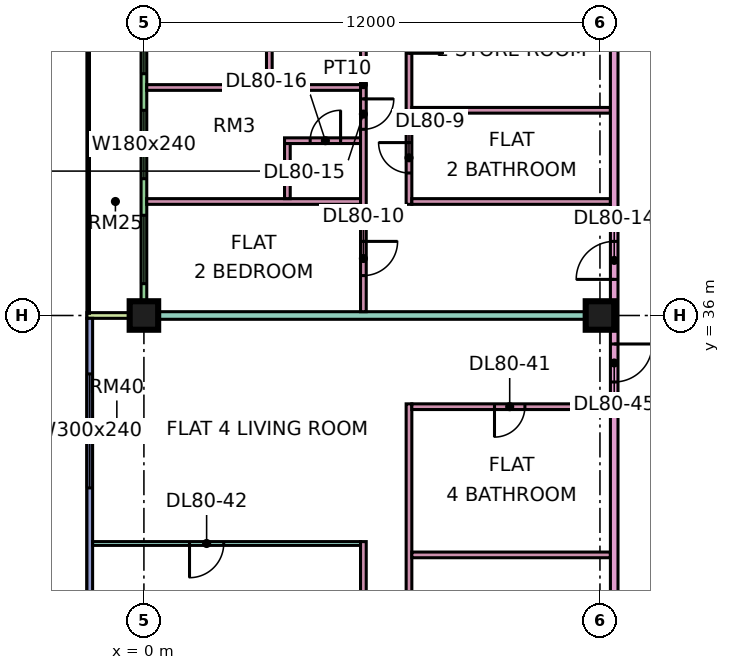
"""IFC4 building model, lengths in metres.
Left out: names, types, materials, properties, quantities, classifications, styles, units other than length and angle.
Written with IfcOpenShell. Run it as: python <this file> out.ifc"""

import sys

from ifc_helpers import new_model, si_unit, direction, frame, frame_2d, origin, origin_2d, place, context, subcontext, project, spatial, rectangle, extrude, element, fill, save


model = new_model("IFC4")
c1 = context("Model", 3, precision=1e-05, world=origin(), true_north=direction((0.0, 1.0)))
c2 = subcontext(c1, "Body", "Model", "MODEL_VIEW")
j1 = project(units=[si_unit("LENGTHUNIT", "METRE"), si_unit("PLANEANGLEUNIT", "RADIAN")], contexts=[c1])
p1 = place(None, origin())
s1 = spatial("IfcSite", under=j1, at=p1, CompositionType="ELEMENT")
p2 = place(p1, origin())
s2 = spatial("IfcBuilding", under=s1, at=p2, CompositionType="ELEMENT")
p3 = place(p2, frame((0.0, 0.0, 346.4)))
s3 = spatial("IfcBuildingStorey", under=s2, at=p3, CompositionType="ELEMENT", Elevation=346.4)
p4 = place(p3, frame((0.0, 36.0, 0.0), z_axis=(0.0, 0.0, 1.0), x_axis=(1.0, 0.0, 0.0)))
e1 = element("IfcColumn", 1, at=p4, inside=s3, PredefinedType="COLUMN", context=c2, shape_type="SweptSolid", body=[
    extrude(rectangle(XDim=0.75, YDim=0.75, at=origin_2d()), origin(), (0.0, 0.0, 1.0), 3.75),
])
p5 = place(p3, frame((12.0, 36.0, 0.0), z_axis=(0.0, 0.0, 1.0), x_axis=(1.0, 0.0, 0.0)))
e2 = element("IfcColumn", 2, at=p5, inside=s3, PredefinedType="COLUMN", context=c2, shape_type="SweptSolid", body=[
    extrude(rectangle(XDim=0.75, YDim=0.75, at=origin_2d()), origin(), (0.0, 0.0, 1.0), 3.75),
])
p6 = place(p3, frame((0.0, 47.925, 0.0), z_axis=(0.0, 0.0, 1.0), x_axis=(0.0, -1.0, 0.0)))
e3 = element("IfcWall", 3, at=p6, inside=s3, PredefinedType="SOLIDWALL", context=c2, shape_type="SweptSolid", body=[
    extrude(rectangle(XDim=11.85, YDim=0.15, at=frame_2d((5.925, 0.0))), origin(), (0.0, 0.0, 1.0), 3.35),
])
p7 = place(p6, frame((0.625, 0.0, 0.0)))
e4 = element("IfcOpeningElement", 4, at=p7, cuts=e3, PredefinedType="OPENING", context=c2, shape_type="SweptSolid", body=[
    extrude(rectangle(XDim=1.2, YDim=2.4, at=frame_2d((0.6, 1.2))), frame((0.0, 0.085, 0.0), z_axis=(0.0, -1.0, 0.0), x_axis=(1.0, 0.0, 0.0)), (0.0, 0.0, 1.0), 0.17),
])
p8 = place(p6, frame((3.762, 0.0, 0.45)))
e5 = element("IfcOpeningElement", 5, at=p8, cuts=e3, PredefinedType="OPENING", context=c2, shape_type="SweptSolid", body=[
    extrude(rectangle(XDim=1.8, YDim=2.4, at=frame_2d((0.9, 1.2))), frame((0.0, 0.085, 0.0), z_axis=(0.0, -1.0, 0.0), x_axis=(1.0, 0.0, 0.0)), (0.0, 0.0, 1.0), 0.17),
])
p9 = place(p6, frame((6.525, 0.0, 0.45)))
e6 = element("IfcOpeningElement", 6, at=p9, cuts=e3, PredefinedType="OPENING", context=c2, shape_type="SweptSolid", body=[
    extrude(rectangle(XDim=1.8, YDim=2.4, at=frame_2d((0.9, 1.2))), frame((0.0, 0.085, 0.0), z_axis=(0.0, -1.0, 0.0), x_axis=(1.0, 0.0, 0.0)), (0.0, 0.0, 1.0), 0.17),
])
p10 = place(p6, frame((9.288, 0.0, 0.45)))
e7 = element("IfcOpeningElement", 7, at=p10, cuts=e3, PredefinedType="OPENING", context=c2, shape_type="SweptSolid", body=[
    extrude(rectangle(XDim=1.8, YDim=2.4, at=frame_2d((0.9, 1.2))), frame((0.0, 0.085, 0.0), z_axis=(0.0, -1.0, 0.0), x_axis=(1.0, 0.0, 0.0)), (0.0, 0.0, 1.0), 0.17),
])
p11 = place(p3, frame((-1.5, 36.0, 0.0), z_axis=(0.0, 0.0, 1.0), x_axis=(1.0, 0.0, 0.0)))
e8 = element("IfcWall", 8, at=p11, inside=s3, PredefinedType="SOLIDWALL", context=c2, shape_type="SweptSolid", body=[
    extrude(rectangle(XDim=1.5, YDim=0.15, at=frame_2d((0.75, 0.0))), origin(), (0.0, 0.0, 1.0), 3.35),
])
p12 = place(p3, frame((-1.425, 35.925, 0.0), z_axis=(0.0, 0.0, 1.0), x_axis=(0.0, -1.0, 0.0)))
e9 = element("IfcWall", 9, at=p12, inside=s3, PredefinedType="SOLIDWALL", context=c2, shape_type="SweptSolid", body=[
    extrude(rectangle(XDim=11.85, YDim=0.15, at=frame_2d((5.925, 0.0))), origin(), (0.0, 0.0, 1.0), 3.35),
])
p13 = place(p12, frame((1.462, 0.0, 0.45)))
e10 = element("IfcOpeningElement", 10, at=p13, cuts=e9, PredefinedType="OPENING", context=c2, shape_type="SweptSolid", body=[
    extrude(rectangle(XDim=3.0, YDim=2.4, at=frame_2d((1.5, 1.2))), frame((0.0, 0.085, 0.0), z_axis=(0.0, -1.0, 0.0), x_axis=(1.0, 0.0, 0.0)), (0.0, 0.0, 1.0), 0.17),
])
p14 = place(p12, frame((7.387, 0.0, 0.45)))
e11 = element("IfcOpeningElement", 11, at=p14, cuts=e9, PredefinedType="OPENING", context=c2, shape_type="SweptSolid", body=[
    extrude(rectangle(XDim=3.0, YDim=2.4, at=frame_2d((1.5, 1.2))), frame((0.0, 0.085, 0.0), z_axis=(0.0, -1.0, 0.0), x_axis=(1.0, 0.0, 0.0)), (0.0, 0.0, 1.0), 0.17),
])
p15 = place(p3, frame((-1.35, 30.0, 0.0), z_axis=(0.0, 0.0, 1.0), x_axis=(1.0, 0.0, 0.0)))
e12 = element("IfcWall", 12, at=p15, inside=s3, PredefinedType="PARTITIONING", context=c2, shape_type="SweptSolid", body=[
    extrude(rectangle(XDim=7.05, YDim=0.1, at=frame_2d((3.525, 0.0))), origin(), (0.0, 0.0, 1.0), 3.35),
])
p16 = place(p15, frame((2.55, 0.0, 0.0)))
e13 = element("IfcOpeningElement", 13, at=p16, cuts=e12, PredefinedType="OPENING", context=c2, shape_type="SweptSolid", body=[
    extrude(rectangle(XDim=0.9, YDim=2.1, at=frame_2d((0.45, 1.05))), frame((0.0, 0.06, 0.0), z_axis=(0.0, -1.0, 0.0), x_axis=(1.0, 0.0, 0.0)), (0.0, 0.0, 1.0), 0.12),
])
e14 = element("IfcWall", 14, at=p4, inside=s3, PredefinedType="PARTITIONING", context=c2, shape_type="SweptSolid", body=[
    extrude(rectangle(XDim=12.275, YDim=0.2, at=frame_2d((6.137, 0.0))), origin(), (0.0, 0.0, 1.0), 3.35),
])
for number, where, z_axis, x_axis in (
    (15, (0.074, 39.0, 0.0), (0.0, 0.0, 1.0), (1.0, 0.0, 0.0)),
    (16, (0.074, 42.0, 0.0), (0.0, 0.0, 1.0), (1.0, 0.0, 0.0)),
):
    element("IfcWall", number, at=place(p3, frame(where, z_axis=z_axis, x_axis=x_axis)), inside=s3, PredefinedType="PARTITIONING", context=c2, shape_type="SweptSolid", body=[
        extrude(rectangle(XDim=5.626, YDim=0.15, at=frame_2d((2.813, 0.0))), origin(), (0.0, 0.0, 1.0), 3.35),
    ])
p17 = place(p3, frame((3.3, 42.075, 0.0), z_axis=(0.0, 0.0, 1.0), x_axis=(0.0, 1.0, 0.0)))
e17 = element("IfcWall", 17, at=p17, inside=s3, PredefinedType="PARTITIONING", context=c2, shape_type="SweptSolid", body=[
    extrude(rectangle(XDim=3.0, YDim=0.15, at=frame_2d((1.5, 0.0))), origin(), (0.0, 0.0, 1.0), 3.35),
])
p18 = place(p17, frame((0.975, 0.0, 0.0)))
e18 = element("IfcOpeningElement", 18, at=p18, cuts=e17, PredefinedType="OPENING", context=c2, shape_type="SweptSolid", body=[
    extrude(rectangle(XDim=0.8, YDim=2.1, at=frame_2d((0.4, 1.05))), frame((0.0, 0.085, 0.0), z_axis=(0.0, -1.0, 0.0), x_axis=(1.0, 0.0, 0.0)), (0.0, 0.0, 1.0), 0.17),
])
p19 = place(p3, frame((3.7, 40.6, 0.0), z_axis=(0.0, 0.0, 1.0), x_axis=(1.0, 0.0, 0.0)))
e19 = element("IfcWall", 19, at=p19, inside=s3, PredefinedType="PARTITIONING", context=c2, shape_type="SweptSolid", body=[
    extrude(rectangle(XDim=2.0, YDim=0.15, at=frame_2d((1.0, 0.0))), origin(), (0.0, 0.0, 1.0), 3.35),
])
p20 = place(p19, frame((0.675, 0.0, 0.0)))
e20 = element("IfcOpeningElement", 20, at=p20, cuts=e19, PredefinedType="OPENING", context=c2, shape_type="SweptSolid", body=[
    extrude(rectangle(XDim=0.8, YDim=2.1, at=frame_2d((0.4, 1.05))), frame((0.0, 0.085, 0.0), z_axis=(0.0, -1.0, 0.0), x_axis=(1.0, 0.0, 0.0)), (0.0, 0.0, 1.0), 0.17),
])
p21 = place(p3, frame((3.775, 39.075, 0.0), z_axis=(0.0, 0.0, 1.0), x_axis=(0.0, 1.0, 0.0)))
e21 = element("IfcWall", 21, at=p21, inside=s3, PredefinedType="PARTITIONING", context=c2, shape_type="SweptSolid", body=[
    extrude(rectangle(XDim=1.45, YDim=0.15, at=frame_2d((0.725, 0.0))), origin(), (0.0, 0.0, 1.0), 3.35),
])
p22 = place(p3, frame((5.775, 22.5, 0.0), z_axis=(0.0, 0.0, 1.0), x_axis=(0.0, 1.0, 0.0)))
e22 = element("IfcWall", 22, at=p22, inside=s3, PredefinedType="PARTITIONING", context=c2, shape_type="SweptSolid", body=[
    extrude(rectangle(XDim=7.55, YDim=0.15, at=frame_2d((3.775, 0.0))), origin(), (0.0, 0.0, 1.0), 3.35),
])
p23 = place(p3, frame((5.775, 36.1, 0.0), z_axis=(0.0, 0.0, 1.0), x_axis=(0.0, 1.0, 0.0)))
e23 = element("IfcWall", 23, at=p23, inside=s3, PredefinedType="PARTITIONING", context=c2, shape_type="SweptSolid", body=[
    extrude(rectangle(XDim=11.95, YDim=0.15, at=frame_2d((5.975, 0.0))), origin(), (0.0, 0.0, 1.0), 3.35),
])
p24 = place(p23, frame((0.95, 0.0, 0.0)))
e24 = element("IfcOpeningElement", 24, at=p24, cuts=e23, PredefinedType="OPENING", context=c2, shape_type="SweptSolid", body=[
    extrude(rectangle(XDim=0.9, YDim=2.1, at=frame_2d((0.45, 1.05))), frame((0.0, 0.085, 0.0), z_axis=(0.0, -1.0, 0.0), x_axis=(1.0, 0.0, 0.0)), (0.0, 0.0, 1.0), 0.17),
])
p25 = place(p23, frame((9.95, 0.0, 0.0)))
e25 = element("IfcOpeningElement", 25, at=p25, cuts=e23, PredefinedType="OPENING", context=c2, shape_type="SweptSolid", body=[
    extrude(rectangle(XDim=0.9, YDim=2.1, at=frame_2d((0.45, 1.05))), frame((0.0, 0.085, 0.0), z_axis=(0.0, -1.0, 0.0), x_axis=(1.0, 0.0, 0.0)), (0.0, 0.0, 1.0), 0.17),
])
p26 = place(p23, frame((4.8, 0.0, 0.0)))
e26 = element("IfcOpeningElement", 26, at=p26, cuts=e23, PredefinedType="OPENING", context=c2, shape_type="SweptSolid", body=[
    extrude(rectangle(XDim=0.8, YDim=2.1, at=frame_2d((0.4, 1.05))), frame((0.0, 0.085, 0.0), z_axis=(0.0, -1.0, 0.0), x_axis=(1.0, 0.0, 0.0)), (0.0, 0.0, 1.0), 0.17),
])
p27 = place(p3, frame((6.975, 22.5, 0.0), z_axis=(0.0, 0.0, 1.0), x_axis=(0.0, 1.0, 0.0)))
e27 = element("IfcWall", 27, at=p27, inside=s3, PredefinedType="PARTITIONING", context=c2, shape_type="SweptSolid", body=[
    extrude(rectangle(XDim=11.175, YDim=0.15, at=frame_2d((5.587, 0.0))), origin(), (0.0, 0.0, 1.0), 3.35),
])
p28 = place(p27, frame((3.05, 0.0, 0.0)))
e28 = element("IfcOpeningElement", 28, at=p28, cuts=e27, PredefinedType="OPENING", context=c2, shape_type="SweptSolid", body=[
    extrude(rectangle(XDim=0.9, YDim=2.1, at=frame_2d((0.45, 1.05))), frame((0.0, 0.085, 0.0), z_axis=(0.0, -1.0, 0.0), x_axis=(1.0, 0.0, 0.0)), (0.0, 0.0, 1.0), 0.17),
])
p29 = place(p3, frame((6.975, 38.925, 0.0), z_axis=(0.0, 0.0, 1.0), x_axis=(0.0, 1.0, 0.0)))
e29 = element("IfcWall", 29, at=p29, inside=s3, PredefinedType="PARTITIONING", context=c2, shape_type="SweptSolid", body=[
    extrude(rectangle(XDim=16.425, YDim=0.15, at=frame_2d((8.212, 0.0))), origin(), (0.0, 0.0, 1.0), 3.35),
])
p30 = place(p29, frame((0.825, 0.0, 0.0)))
e30 = element("IfcOpeningElement", 30, at=p30, cuts=e29, PredefinedType="OPENING", context=c2, shape_type="SweptSolid", body=[
    extrude(rectangle(XDim=0.8, YDim=2.1, at=frame_2d((0.4, 1.05))), frame((0.0, 0.085, 0.0), z_axis=(0.0, -1.0, 0.0), x_axis=(1.0, 0.0, 0.0)), (0.0, 0.0, 1.0), 0.17),
])
p31 = place(p29, frame((12.825, 0.0, 0.0)))
e31 = element("IfcOpeningElement", 31, at=p31, cuts=e29, PredefinedType="OPENING", context=c2, shape_type="SweptSolid", body=[
    extrude(rectangle(XDim=0.9, YDim=2.1, at=frame_2d((0.45, 1.05))), frame((0.0, 0.085, 0.0), z_axis=(0.0, -1.0, 0.0), x_axis=(1.0, 0.0, 0.0)), (0.0, 0.0, 1.0), 0.17),
])
p32 = place(p29, frame((3.975, 0.0, 0.0)))
e32 = element("IfcOpeningElement", 32, at=p32, cuts=e29, PredefinedType="OPENING", context=c2, shape_type="SweptSolid", body=[
    extrude(rectangle(XDim=0.9, YDim=2.1, at=frame_2d((0.45, 1.05))), frame((0.0, 0.085, 0.0), z_axis=(0.0, -1.0, 0.0), x_axis=(1.0, 0.0, 0.0)), (0.0, 0.0, 1.0), 0.17),
])
p33 = place(p29, frame((7.125, 0.0, 0.0)))
e33 = element("IfcOpeningElement", 33, at=p33, cuts=e29, PredefinedType="OPENING", context=c2, shape_type="SweptSolid", body=[
    extrude(rectangle(XDim=0.9, YDim=2.1, at=frame_2d((0.45, 1.05))), frame((0.0, 0.085, 0.0), z_axis=(0.0, -1.0, 0.0), x_axis=(1.0, 0.0, 0.0)), (0.0, 0.0, 1.0), 0.17),
])
p34 = place(p29, frame((9.675, 0.0, 0.0)))
e34 = element("IfcOpeningElement", 34, at=p34, cuts=e29, PredefinedType="OPENING", context=c2, shape_type="SweptSolid", body=[
    extrude(rectangle(XDim=0.8, YDim=2.1, at=frame_2d((0.4, 1.05))), frame((0.0, 0.085, 0.0), z_axis=(0.0, -1.0, 0.0), x_axis=(1.0, 0.0, 0.0)), (0.0, 0.0, 1.0), 0.17),
])
p35 = place(p3, frame((7.05, 29.7, 0.0), z_axis=(0.0, 0.0, 1.0), x_axis=(1.0, 0.0, 0.0)))
e35 = element("IfcWall", 35, at=p35, inside=s3, PredefinedType="PARTITIONING", context=c2, shape_type="SweptSolid", body=[
    extrude(rectangle(XDim=5.225, YDim=0.15, at=frame_2d((2.612, 0.0))), origin(), (0.0, 0.0, 1.0), 3.35),
])
p36 = place(p3, frame((7.05, 33.6, 0.0), z_axis=(0.0, 0.0, 1.0), x_axis=(1.0, 0.0, 0.0)))
e36 = element("IfcWall", 36, at=p36, inside=s3, PredefinedType="PARTITIONING", context=c2, shape_type="SweptSolid", body=[
    extrude(rectangle(XDim=5.225, YDim=0.15, at=frame_2d((2.612, 0.0))), origin(), (0.0, 0.0, 1.0), 3.35),
])
p37 = place(p36, frame((2.175, 0.0, 0.0)))
e37 = element("IfcOpeningElement", 37, at=p37, cuts=e36, PredefinedType="OPENING", context=c2, shape_type="SweptSolid", body=[
    extrude(rectangle(XDim=0.8, YDim=2.1, at=frame_2d((0.4, 1.05))), frame((0.0, 0.085, 0.0), z_axis=(0.0, -1.0, 0.0), x_axis=(1.0, 0.0, 0.0)), (0.0, 0.0, 1.0), 0.17),
])
for number, where, z_axis, x_axis in (
    (38, (7.05, 39.0, 0.0), (0.0, 0.0, 1.0), (1.0, 0.0, 0.0)),
    (39, (7.05, 41.4, 0.0), (0.0, 0.0, 1.0), (1.0, 0.0, 0.0)),
):
    element("IfcWall", number, at=place(p3, frame(where, z_axis=z_axis, x_axis=x_axis)), inside=s3, PredefinedType="PARTITIONING", context=c2, shape_type="SweptSolid", body=[
        extrude(rectangle(XDim=5.225, YDim=0.15, at=frame_2d((2.612, 0.0))), origin(), (0.0, 0.0, 1.0), 3.35),
    ])
p38 = place(p3, frame((12.375, 20.0, 0.0), z_axis=(0.0, 0.0, 1.0), x_axis=(0.0, 1.0, 0.0)))
e40 = element("IfcWall", 40, at=p38, inside=s3, PredefinedType="PARTITIONING", context=c2, shape_type="SweptSolid", body=[
    extrude(rectangle(XDim=33.926, YDim=0.2, at=frame_2d((16.963, 0.0))), origin(), (0.0, 0.0, 1.0), 3.35),
])
p39 = place(p38, frame((16.95, 0.0, 0.0)))
e41 = element("IfcOpeningElement", 41, at=p39, cuts=e40, PredefinedType="OPENING", context=c2, shape_type="SweptSolid", body=[
    extrude(rectangle(XDim=1.0, YDim=2.1, at=frame_2d((0.5, 1.05))), frame((0.0, 0.11, 0.0), z_axis=(0.0, -1.0, 0.0), x_axis=(1.0, 0.0, 0.0)), (0.0, 0.0, 1.0), 0.22),
])
p40 = place(p38, frame((0.6, 0.0, 0.0)))
e42 = element("IfcOpeningElement", 42, at=p40, cuts=e40, PredefinedType="OPENING", context=c2, shape_type="SweptSolid", body=[
    extrude(rectangle(XDim=1.2, YDim=2.1, at=frame_2d((0.6, 1.05))), frame((0.0, 0.11, 0.0), z_axis=(0.0, -1.0, 0.0), x_axis=(1.0, 0.0, 0.0)), (0.0, 0.0, 1.0), 0.22),
])
p41 = place(p38, frame((14.25, 0.0, 0.0)))
e43 = element("IfcOpeningElement", 43, at=p41, cuts=e40, PredefinedType="OPENING", context=c2, shape_type="SweptSolid", body=[
    extrude(rectangle(XDim=1.0, YDim=2.1, at=frame_2d((0.5, 1.05))), frame((0.0, 0.11, 0.0), z_axis=(0.0, -1.0, 0.0), x_axis=(1.0, 0.0, 0.0)), (0.0, 0.0, 1.0), 0.22),
])
p42 = place(p8, origin())
e44 = element("IfcWindow", 44, at=p42, inside=s3, PartitioningType="SINGLE_PANEL", PredefinedType="WINDOW", context=c2, shape_type="SweptSolid", body=[
    extrude(rectangle(XDim=1.8, YDim=2.4, at=frame_2d((0.9, 1.2))), frame((0.0, 0.03, 0.0), z_axis=(0.0, -1.0, 0.0), x_axis=(1.0, 0.0, 0.0)), (0.0, 0.0, 1.0), 0.06),
])
fill(e5, e44)
p43 = place(p9, origin())
e45 = element("IfcWindow", 45, at=p43, inside=s3, PartitioningType="SINGLE_PANEL", PredefinedType="WINDOW", context=c2, shape_type="SweptSolid", body=[
    extrude(rectangle(XDim=1.8, YDim=2.4, at=frame_2d((0.9, 1.2))), frame((0.0, 0.03, 0.0), z_axis=(0.0, -1.0, 0.0), x_axis=(1.0, 0.0, 0.0)), (0.0, 0.0, 1.0), 0.06),
])
fill(e6, e45)
p44 = place(p10, origin())
e46 = element("IfcWindow", 46, at=p44, inside=s3, PartitioningType="SINGLE_PANEL", PredefinedType="WINDOW", context=c2, shape_type="SweptSolid", body=[
    extrude(rectangle(XDim=1.8, YDim=2.4, at=frame_2d((0.9, 1.2))), frame((0.0, 0.03, 0.0), z_axis=(0.0, -1.0, 0.0), x_axis=(1.0, 0.0, 0.0)), (0.0, 0.0, 1.0), 0.06),
])
fill(e7, e46)
p45 = place(p13, origin())
e47 = element("IfcWindow", 47, at=p45, inside=s3, PartitioningType="SINGLE_PANEL", PredefinedType="WINDOW", context=c2, shape_type="SweptSolid", body=[
    extrude(rectangle(XDim=3.0, YDim=2.4, at=frame_2d((1.5, 1.2))), frame((0.0, 0.03, 0.0), z_axis=(0.0, -1.0, 0.0), x_axis=(1.0, 0.0, 0.0)), (0.0, 0.0, 1.0), 0.06),
])
fill(e10, e47)
p46 = place(p30, frame((0.8, 0.0, 0.0), z_axis=(0.0, 0.0, 1.0), x_axis=(-1.0, 0.0, 0.0)))
e48 = element("IfcDoor", 48, at=p46, inside=s3, OperationType="SINGLE_SWING_RIGHT", PredefinedType="DOOR", context=c2, shape_type="SweptSolid", body=[
    extrude(rectangle(XDim=0.8, YDim=2.1, at=frame_2d((0.4, 1.05))), frame((0.0, 0.025, 0.0), z_axis=(0.0, -1.0, 0.0), x_axis=(1.0, 0.0, 0.0)), (0.0, 0.0, 1.0), 0.05),
])
fill(e30, e48)
p47 = place(p24, origin())
e49 = element("IfcDoor", 49, at=p47, inside=s3, OperationType="SINGLE_SWING_RIGHT", PredefinedType="DOOR", context=c2, shape_type="SweptSolid", body=[
    extrude(rectangle(XDim=0.9, YDim=2.1, at=frame_2d((0.45, 1.05))), frame((0.0, 0.025, 0.0), z_axis=(0.0, -1.0, 0.0), x_axis=(1.0, 0.0, 0.0)), (0.0, 0.0, 1.0), 0.05),
])
fill(e24, e49)
p48 = place(p39, origin())
e50 = element("IfcDoor", 50, at=p48, inside=s3, OperationType="SINGLE_SWING_LEFT", PredefinedType="DOOR", context=c2, shape_type="SweptSolid", body=[
    extrude(rectangle(XDim=1.0, YDim=2.1, at=frame_2d((0.5, 1.05))), frame((0.0, 0.025, 0.0), z_axis=(0.0, -1.0, 0.0), x_axis=(1.0, 0.0, 0.0)), (0.0, 0.0, 1.0), 0.05),
])
fill(e41, e50)
p49 = place(p26, origin())
e51 = element("IfcDoor", 51, at=p49, inside=s3, OperationType="SINGLE_SWING_RIGHT", PredefinedType="DOOR", context=c2, shape_type="SweptSolid", body=[
    extrude(rectangle(XDim=0.8, YDim=2.1, at=frame_2d((0.4, 1.05))), frame((0.0, 0.025, 0.0), z_axis=(0.0, -1.0, 0.0), x_axis=(1.0, 0.0, 0.0)), (0.0, 0.0, 1.0), 0.05),
])
fill(e26, e51)
p50 = place(p20, frame((0.8, 0.0, 0.0), z_axis=(0.0, 0.0, 1.0), x_axis=(-1.0, 0.0, 0.0)))
e52 = element("IfcDoor", 52, at=p50, inside=s3, OperationType="SINGLE_SWING_RIGHT", PredefinedType="DOOR", context=c2, shape_type="SweptSolid", body=[
    extrude(rectangle(XDim=0.8, YDim=2.1, at=frame_2d((0.4, 1.05))), frame((0.0, 0.025, 0.0), z_axis=(0.0, -1.0, 0.0), x_axis=(1.0, 0.0, 0.0)), (0.0, 0.0, 1.0), 0.05),
])
fill(e20, e52)
p51 = place(p32, frame((0.9, 0.0, 0.0), z_axis=(0.0, 0.0, 1.0), x_axis=(-1.0, 0.0, 0.0)))
e53 = element("IfcDoor", 53, at=p51, inside=s3, OperationType="SINGLE_SWING_LEFT", PredefinedType="DOOR", context=c2, shape_type="SweptSolid", body=[
    extrude(rectangle(XDim=0.9, YDim=2.1, at=frame_2d((0.45, 1.05))), frame((0.0, 0.025, 0.0), z_axis=(0.0, -1.0, 0.0), x_axis=(1.0, 0.0, 0.0)), (0.0, 0.0, 1.0), 0.05),
])
fill(e32, e53)
p52 = place(p37, frame((0.8, 0.0, 0.0), z_axis=(0.0, 0.0, 1.0), x_axis=(-1.0, 0.0, 0.0)))
e54 = element("IfcDoor", 54, at=p52, inside=s3, OperationType="SINGLE_SWING_LEFT", PredefinedType="DOOR", context=c2, shape_type="SweptSolid", body=[
    extrude(rectangle(XDim=0.8, YDim=2.1, at=frame_2d((0.4, 1.05))), frame((0.0, 0.025, 0.0), z_axis=(0.0, -1.0, 0.0), x_axis=(1.0, 0.0, 0.0)), (0.0, 0.0, 1.0), 0.05),
])
fill(e37, e54)
p53 = place(p16, frame((0.9, 0.0, 0.0), z_axis=(0.0, 0.0, 1.0), x_axis=(-1.0, 0.0, 0.0)))
e55 = element("IfcDoor", 55, at=p53, inside=s3, OperationType="SINGLE_SWING_LEFT", PredefinedType="DOOR", context=c2, shape_type="SweptSolid", body=[
    extrude(rectangle(XDim=0.9, YDim=2.1, at=frame_2d((0.45, 1.05))), frame((0.0, 0.025, 0.0), z_axis=(0.0, -1.0, 0.0), x_axis=(1.0, 0.0, 0.0)), (0.0, 0.0, 1.0), 0.05),
])
fill(e13, e55)
p54 = place(p41, origin())
e56 = element("IfcDoor", 56, at=p54, inside=s3, OperationType="SINGLE_SWING_RIGHT", PredefinedType="DOOR", context=c2, shape_type="SweptSolid", body=[
    extrude(rectangle(XDim=1.0, YDim=2.1, at=frame_2d((0.5, 1.05))), frame((0.0, 0.025, 0.0), z_axis=(0.0, -1.0, 0.0), x_axis=(1.0, 0.0, 0.0)), (0.0, 0.0, 1.0), 0.05),
])
fill(e43, e56)
save(model, sys.argv[1])
